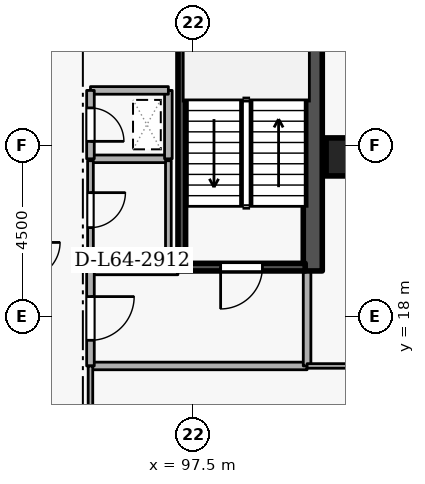
"""IFC4 building model, lengths in metres.
Left out: names, types, materials, properties, quantities, classifications, styles, units other than length and angle.
Written with IfcOpenShell. Run it as: python <this file> out.ifc"""

import sys

from ifc_helpers import new_model, si_unit, direction, frame, frame_2d, origin, origin_2d, place, context, subcontext, project, spatial, rectangle, extrude, element, fill, save


model = new_model("IFC4")
c1 = context("Model", 3, precision=1e-05, world=origin(), true_north=direction((0.0, 1.0)))
c2 = subcontext(c1, "Body", "Model", "MODEL_VIEW")
j1 = project(units=[si_unit("LENGTHUNIT", "METRE"), si_unit("PLANEANGLEUNIT", "RADIAN")], contexts=[c1])
p1 = place(None, origin())
s1 = spatial("IfcSite", under=j1, at=p1, CompositionType="ELEMENT")
p2 = place(p1, origin())
s2 = spatial("IfcBuilding", under=s1, at=p2, CompositionType="ELEMENT")
p3 = place(p2, frame((0.0, 0.0, 240.3)))
s3 = spatial("IfcBuildingStorey", under=s2, at=p3, CompositionType="ELEMENT", Elevation=240.3)
p4 = place(p3, frame((100.65, 19.2, 0.0), z_axis=(0.0, 0.0, 1.0), x_axis=(0.0, 1.0, 0.0)))
e1 = element("IfcWall", 1, at=p4, inside=s3, PredefinedType="SHEAR", context=c2, shape_type="SweptSolid", body=[
    extrude(rectangle(XDim=15.6, YDim=0.5, at=frame_2d((7.8, 0.0))), origin(), (0.0, 0.0, 1.0), 3.6),
])
p5 = place(p3, frame((101.5, 22.2, 0.0), z_axis=(0.0, 0.0, 1.0), x_axis=(1.0, 0.0, 0.0)))
e2 = element("IfcColumn", 2, at=p5, inside=s3, PredefinedType="COLUMN", context=c2, shape_type="SweptSolid", body=[
    extrude(rectangle(XDim=1.0, YDim=1.0, at=origin_2d()), origin(), (0.0, 0.0, 1.0), 3.6),
])
p6 = place(p3, frame((100.45, 19.3, 0.0), z_axis=(0.0, 0.0, 1.0), x_axis=(-1.0, 0.0, 0.0)))
e3 = element("IfcWall", 3, at=p6, inside=s3, PredefinedType="SHEAR", context=c2, shape_type="SweptSolid", body=[
    extrude(rectangle(XDim=3.35, YDim=0.2, at=frame_2d((1.675, 0.0))), origin(), (0.0, 0.0, 1.0), 3.6),
])
p7 = place(p6, frame((1.125, 0.0, 0.0)))
e4 = element("IfcOpeningElement", 4, at=p7, cuts=e3, PredefinedType="OPENING", context=c2, shape_type="SweptSolid", body=[
    extrude(rectangle(XDim=1.1, YDim=2.1, at=frame_2d((0.55, 1.05))), frame((0.0, 0.11, 0.0), z_axis=(0.0, -1.0, 0.0), x_axis=(1.0, 0.0, 0.0)), (0.0, 0.0, 1.0), 0.22),
])
p8 = place(p3, frame((97.203, 26.55, 0.0), z_axis=(0.0, 0.0, 1.0), x_axis=(0.0, -1.0, 0.0)))
e5 = element("IfcWall", 5, at=p8, inside=s3, PredefinedType="SHEAR", context=c2, shape_type="SweptSolid", body=[
    extrude(rectangle(XDim=7.1, YDim=0.2, at=frame_2d((3.55, 0.0))), origin(), (0.0, 0.0, 1.0), 3.6),
])
p9 = place(p3, frame((94.8, 16.7, 0.0), z_axis=(0.0, 0.0, 1.0), x_axis=(1.0, 0.0, 0.0)))
e6 = element("IfcWall", 6, at=p9, inside=s3, PredefinedType="STANDARD", context=c2, shape_type="SweptSolid", body=[
    extrude(rectangle(XDim=5.7, YDim=0.2, at=frame_2d((2.85, 0.0))), origin(), (0.0, 0.0, 1.0), 3.34),
])
p10 = place(p3, frame((100.5, 16.7, 0.0), z_axis=(0.0, 0.0, 1.0), x_axis=(0.0, 1.0, 0.0)))
e7 = element("IfcWall", 7, at=p10, inside=s3, PredefinedType="STANDARD", context=c2, shape_type="SweptSolid", body=[
    extrude(rectangle(XDim=2.5, YDim=0.2, at=frame_2d((1.25, 0.0))), origin(), (0.0, 0.0, 1.0), 3.34),
])
p11 = place(p3, frame((97.1, 19.2, 0.0), z_axis=(0.0, 0.0, 1.0), x_axis=(-1.0, 0.0, 0.0)))
e8 = element("IfcWall", 8, at=p11, inside=s3, PredefinedType="STANDARD", context=c2, shape_type="SweptSolid", body=[
    extrude(rectangle(XDim=2.3, YDim=0.2, at=frame_2d((1.15, 0.0))), origin(), (0.0, 0.0, 1.0), 2.545),
])
p12 = place(p3, frame((94.8, 19.2, 0.0), z_axis=(0.0, 0.0, 1.0), x_axis=(0.0, -1.0, 0.0)))
e9 = element("IfcWall", 9, at=p12, inside=s3, PredefinedType="STANDARD", context=c2, shape_type="SweptSolid", body=[
    extrude(rectangle(XDim=2.5, YDim=0.2, at=frame_2d((1.25, 0.0))), origin(), (0.0, 0.0, 1.0), 3.34),
])
p13 = place(p12, frame((0.675, 0.0, 0.0)))
e10 = element("IfcOpeningElement", 10, at=p13, cuts=e9, PredefinedType="OPENING", context=c2, shape_type="SweptSolid", body=[
    extrude(rectangle(XDim=1.15, YDim=2.1, at=frame_2d((0.575, 1.05))), frame((0.0, 0.11, 0.0), z_axis=(0.0, -1.0, 0.0), x_axis=(1.0, 0.0, 0.0)), (0.0, 0.0, 1.0), 0.22),
])
p14 = place(p3, frame((94.8, 22.15, 0.0), z_axis=(0.0, 0.0, 1.0), x_axis=(1.0, 0.0, 0.0)))
e11 = element("IfcWall", 11, at=p14, inside=s3, PredefinedType="STANDARD", context=c2, shape_type="SweptSolid", body=[
    extrude(rectangle(XDim=2.05, YDim=0.2, at=frame_2d((1.025, 0.0))), origin(), (0.0, 0.0, 1.0), 3.34),
])
p15 = place(p3, frame((96.85, 22.15, 0.0), z_axis=(0.0, 0.0, 1.0), x_axis=(0.0, 1.0, 0.0)))
e12 = element("IfcWall", 12, at=p15, inside=s3, PredefinedType="STANDARD", context=c2, shape_type="SweptSolid", body=[
    extrude(rectangle(XDim=1.8, YDim=0.2, at=frame_2d((0.9, 0.0))), origin(), (0.0, 0.0, 1.0), 3.34),
])
p16 = place(p3, frame((96.85, 23.95, 0.0), z_axis=(0.0, 0.0, 1.0), x_axis=(-1.0, 0.0, 0.0)))
e13 = element("IfcWall", 13, at=p16, inside=s3, PredefinedType="STANDARD", context=c2, shape_type="SweptSolid", body=[
    extrude(rectangle(XDim=2.05, YDim=0.2, at=frame_2d((1.025, 0.0))), origin(), (0.0, 0.0, 1.0), 3.34),
])
p17 = place(p3, frame((94.8, 23.95, 0.0), z_axis=(0.0, 0.0, 1.0), x_axis=(0.0, -1.0, 0.0)))
e14 = element("IfcWall", 14, at=p17, inside=s3, PredefinedType="STANDARD", context=c2, shape_type="SweptSolid", body=[
    extrude(rectangle(XDim=1.8, YDim=0.2, at=frame_2d((0.9, 0.0))), origin(), (0.0, 0.0, 1.0), 3.34),
])
p18 = place(p17, frame((0.46, 0.0, 0.0)))
e15 = element("IfcOpeningElement", 15, at=p18, cuts=e14, PredefinedType="OPENING", context=c2, shape_type="SweptSolid", body=[
    extrude(rectangle(XDim=0.88, YDim=2.04, at=frame_2d((0.44, 1.02))), frame((0.0, 0.11, 0.0), z_axis=(0.0, -1.0, 0.0), x_axis=(1.0, 0.0, 0.0)), (0.0, 0.0, 1.0), 0.22),
])
p19 = place(p3, frame((94.8, 19.5, 0.0), z_axis=(0.0, 0.0, 1.0), x_axis=(1.0, 0.0, 0.0)))
e16 = element("IfcWall", 16, at=p19, inside=s3, PredefinedType="PARTITIONING", context=c2, shape_type="SweptSolid", body=[
    extrude(rectangle(XDim=2.05, YDim=0.15, at=frame_2d((1.025, 0.0))), origin(), (0.0, 0.0, 1.0), 2.545),
])
p20 = place(p3, frame((96.85, 19.5, 0.0), z_axis=(0.0, 0.0, 1.0), x_axis=(0.0, 1.0, 0.0)))
e17 = element("IfcWall", 17, at=p20, inside=s3, PredefinedType="PARTITIONING", context=c2, shape_type="SweptSolid", body=[
    extrude(rectangle(XDim=2.6, YDim=0.15, at=frame_2d((1.3, 0.0))), origin(), (0.0, 0.0, 1.0), 3.34),
])
p21 = place(p3, frame((94.8, 22.1, 0.0), z_axis=(0.0, 0.0, 1.0), x_axis=(0.0, -1.0, 0.0)))
e18 = element("IfcWall", 18, at=p21, inside=s3, PredefinedType="PARTITIONING", context=c2, shape_type="SweptSolid", body=[
    extrude(rectangle(XDim=2.6, YDim=0.15, at=frame_2d((1.3, 0.0))), origin(), (0.0, 0.0, 1.0), 3.34),
])
p22 = place(p21, frame((0.84, 0.0, 0.0)))
e19 = element("IfcOpeningElement", 19, at=p22, cuts=e18, PredefinedType="OPENING", context=c2, shape_type="SweptSolid", body=[
    extrude(rectangle(XDim=0.92, YDim=2.08, at=frame_2d((0.46, 1.04))), frame((0.0, 0.085, 0.0), z_axis=(0.0, -1.0, 0.0), x_axis=(1.0, 0.0, 0.0)), (0.0, 0.0, 1.0), 0.17),
])
p23 = place(p3, frame((94.8, 14.75, 0.0), z_axis=(0.0, 0.0, 1.0), x_axis=(0.0, 1.0, 0.0)))
e20 = element("IfcWall", 20, at=p23, inside=s3, PredefinedType="PARTITIONING", context=c2, shape_type="SweptSolid", body=[
    extrude(rectangle(XDim=1.95, YDim=0.12, at=frame_2d((0.975, 0.0))), origin(), (0.0, 0.0, 1.0), 3.34),
])
p24 = place(p3, frame((100.5, 16.7, 0.0), z_axis=(0.0, 0.0, 1.0), x_axis=(1.0, 0.0, 0.0)))
e21 = element("IfcWall", 21, at=p24, inside=s3, PredefinedType="PARTITIONING", context=c2, shape_type="SweptSolid", body=[
    extrude(rectangle(XDim=11.72, YDim=0.12, at=frame_2d((5.86, 0.0))), origin(), (0.0, 0.0, 1.0), 3.34),
])
p25 = place(p7, origin())
e22 = element("IfcDoor", 22, at=p25, inside=s3, OperationType="SINGLE_SWING_RIGHT", PredefinedType="DOOR", context=c2, shape_type="SweptSolid", body=[
    extrude(rectangle(XDim=1.1, YDim=2.1, at=frame_2d((0.55, 1.05))), frame((0.0, 0.025, 0.0), z_axis=(0.0, -1.0, 0.0), x_axis=(1.0, 0.0, 0.0)), (0.0, 0.0, 1.0), 0.05),
])
fill(e4, e22)
p26 = place(p13, origin())
e23 = element("IfcDoor", 23, at=p26, inside=s3, OperationType="SINGLE_SWING_LEFT", PredefinedType="DOOR", context=c2, shape_type="SweptSolid", body=[
    extrude(rectangle(XDim=1.15, YDim=2.1, at=frame_2d((0.575, 1.05))), frame((0.0, 0.025, 0.0), z_axis=(0.0, -1.0, 0.0), x_axis=(1.0, 0.0, 0.0)), (0.0, 0.0, 1.0), 0.05),
])
fill(e10, e23)
p27 = place(p18, origin())
e24 = element("IfcDoor", 24, at=p27, inside=s3, OperationType="SINGLE_SWING_RIGHT", PredefinedType="DOOR", context=c2, shape_type="SweptSolid", body=[
    extrude(rectangle(XDim=0.88, YDim=2.04, at=frame_2d((0.44, 1.02))), frame((0.0, 0.025, 0.0), z_axis=(0.0, -1.0, 0.0), x_axis=(1.0, 0.0, 0.0)), (0.0, 0.0, 1.0), 0.05),
])
fill(e15, e24)
p28 = place(p22, origin())
e25 = element("IfcDoor", 25, at=p28, inside=s3, OperationType="SINGLE_SWING_LEFT", PredefinedType="DOOR", context=c2, shape_type="SweptSolid", body=[
    extrude(rectangle(XDim=0.92, YDim=2.08, at=frame_2d((0.46, 1.04))), frame((0.0, 0.025, 0.0), z_axis=(0.0, -1.0, 0.0), x_axis=(1.0, 0.0, 0.0)), (0.0, 0.0, 1.0), 0.05),
])
fill(e19, e25)
save(model, sys.argv[1])
